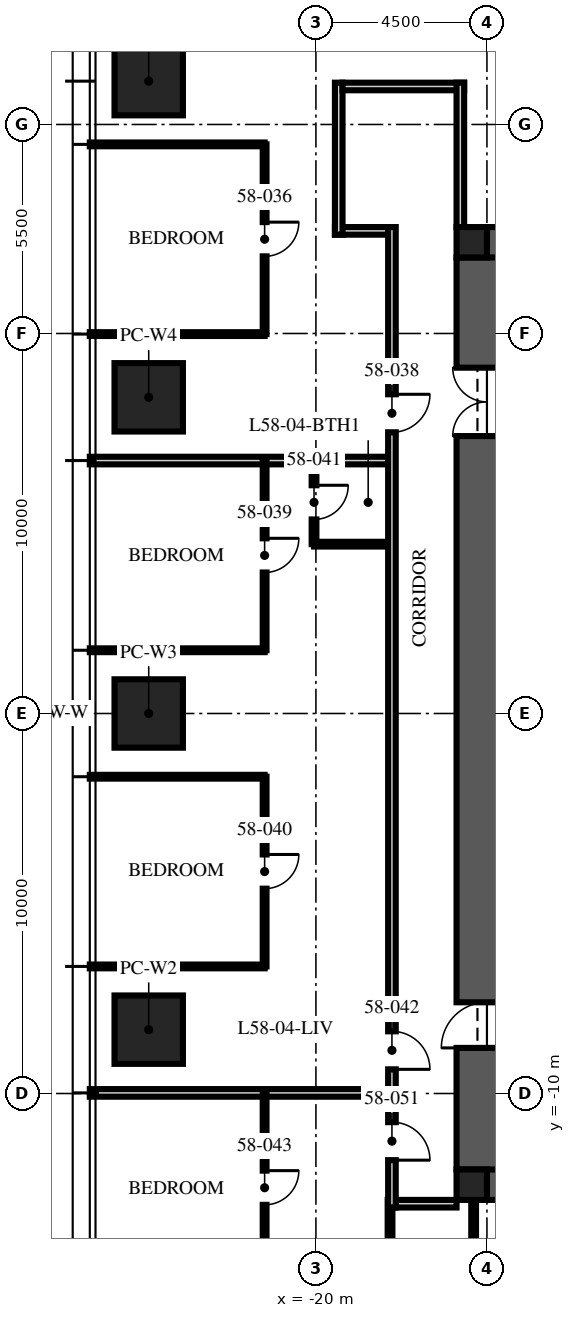
"""IFC4 building model, lengths in metres.
Left out: names, types, materials, properties, quantities, classifications, styles, units other than length and angle.
Written with IfcOpenShell. Run it as: python <this file> out.ifc"""

import sys

from ifc_helpers import new_model, si_unit, direction, frame, frame_2d, origin, origin_2d, place, context, subcontext, project, spatial, rectangle, extrude, element, fill, save


model = new_model("IFC4")
c1 = context("Model", 3, precision=1e-05, world=origin(), true_north=direction((0.0, 1.0)))
c2 = subcontext(c1, "Body", "Model", "MODEL_VIEW")
j1 = project(units=[si_unit("LENGTHUNIT", "METRE"), si_unit("PLANEANGLEUNIT", "RADIAN")], contexts=[c1])
p1 = place(None, origin())
s1 = spatial("IfcSite", under=j1, at=p1, CompositionType="ELEMENT")
p2 = place(p1, origin())
s2 = spatial("IfcBuilding", under=s1, at=p2, CompositionType="ELEMENT")
p3 = place(p2, frame((0.0, 0.0, 233.25)))
s3 = spatial("IfcBuildingStorey", under=s2, at=p3, CompositionType="ELEMENT", Elevation=233.25)
for number, where, z_axis, x_axis in (
    (1, (-15.5, 12.0, -0.25), (0.0, 0.0, 1.0), (1.0, 0.0, 0.0)),
    (2, (-15.5, -12.0, -0.25), (0.0, 0.0, 1.0), (1.0, 0.0, 0.0)),
):
    element("IfcWall", number, at=place(p3, frame(where, z_axis=z_axis, x_axis=x_axis)), inside=s3, PredefinedType="SHEAR", context=c2, shape_type="SweptSolid", body=[
        extrude(rectangle(XDim=31.0, YDim=1.6, at=frame_2d((15.5, 0.0))), origin(), (0.0, 0.0, 1.0), 3.75),
    ])
p4 = place(p3, frame((-15.5, -12.0, -0.25), z_axis=(0.0, 0.0, 1.0), x_axis=(0.0, 1.0, 0.0)))
e3 = element("IfcWall", 3, at=p4, inside=s3, PredefinedType="SHEAR", context=c2, shape_type="SweptSolid", body=[
    extrude(rectangle(XDim=24.0, YDim=1.6, at=frame_2d((12.0, 0.0))), origin(), (0.0, 0.0, 1.0), 3.75),
])
p5 = place(p4, frame((3.2, 0.0, 0.25)))
e4 = element("IfcOpeningElement", 4, at=p5, cuts=e3, PredefinedType="OPENING", context=c2, shape_type="SweptSolid", body=[
    extrude(rectangle(XDim=1.2, YDim=2.1, at=frame_2d((0.6, 1.05))), frame((0.0, 0.81, 0.0), z_axis=(0.0, -1.0, 0.0), x_axis=(1.0, 0.0, 0.0)), (0.0, 0.0, 1.0), 1.62),
])
p6 = place(p4, frame((19.3, 0.0, 0.25)))
e5 = element("IfcOpeningElement", 5, at=p6, cuts=e3, PredefinedType="OPENING", context=c2, shape_type="SweptSolid", body=[
    extrude(rectangle(XDim=1.8, YDim=2.1, at=frame_2d((0.9, 1.05))), frame((0.0, 0.81, 0.0), z_axis=(0.0, -1.0, 0.0), x_axis=(1.0, 0.0, 0.0)), (0.0, 0.0, 1.0), 1.62),
])
for number, where, z_axis, x_axis in (
    (6, (-15.9, 12.4, -0.25), (0.0, 0.0, 1.0), (1.0, 0.0, 0.0)),
    (7, (-15.9, -12.4, -0.25), (0.0, 0.0, 1.0), (1.0, 0.0, 0.0)),
):
    element("IfcColumn", number, at=place(p3, frame(where, z_axis=z_axis, x_axis=x_axis)), inside=s3, PredefinedType="COLUMN", context=c2, shape_type="SweptSolid", body=[
        extrude(rectangle(XDim=0.8, YDim=0.8, at=origin_2d()), origin(), (0.0, 0.0, 1.0), 3.75),
    ])
for number, where, z_axis, x_axis in (
    (8, (-24.4, -8.32, 0.0), (0.0, 0.0, 1.0), (0.0, 1.0, 0.0)),
    (9, (-24.4, 0.0, 0.0), (0.0, 0.0, 1.0), (0.0, 1.0, 0.0)),
    (10, (-24.4, 8.32, 0.0), (0.0, 0.0, 1.0), (0.0, 1.0, 0.0)),
    (11, (-24.4, 16.64, 0.0), (0.0, 0.0, 1.0), (0.0, 1.0, 0.0)),
):
    element("IfcColumn", number, at=place(p3, frame(where, z_axis=z_axis, x_axis=x_axis)), inside=s3, PredefinedType="COLUMN", context=c2, shape_type="SweptSolid", body=[
        extrude(rectangle(XDim=1.8, YDim=1.8, at=origin_2d()), origin(), (0.0, 0.0, 1.0), 3.75),
    ])
p7 = place(p3, frame((-18.1, 12.7, 0.0), z_axis=(0.0, 0.0, 1.0), x_axis=(-1.0, 0.0, 0.0)))
e12 = element("IfcWall", 12, at=p7, inside=s3, PredefinedType="PARTITIONING", context=c2, shape_type="SweptSolid", body=[
    extrude(rectangle(XDim=1.4, YDim=0.2, at=frame_2d((0.7, 0.0))), origin(), (0.0, 0.0, 1.0), 2.81),
])
p8 = place(p3, frame((-19.4, 12.6, 0.0), z_axis=(0.0, 0.0, 1.0), x_axis=(0.0, 1.0, 0.0)))
e13 = element("IfcWall", 13, at=p8, inside=s3, PredefinedType="PARTITIONING", context=c2, shape_type="SweptSolid", body=[
    extrude(rectangle(XDim=4.0, YDim=0.2, at=frame_2d((2.0, 0.0))), origin(), (0.0, 0.0, 1.0), 2.6),
])
p9 = place(p3, frame((-19.3, 16.5, 0.0), z_axis=(0.0, 0.0, 1.0), x_axis=(1.0, 0.0, 0.0)))
e14 = element("IfcWall", 14, at=p9, inside=s3, PredefinedType="PARTITIONING", context=c2, shape_type="SweptSolid", body=[
    extrude(rectangle(XDim=3.2, YDim=0.2, at=frame_2d((1.6, 0.0))), origin(), (0.0, 0.0, 1.0), 2.3),
])
p10 = place(p3, frame((-16.2, 16.6, 0.0), z_axis=(0.0, 0.0, 1.0), x_axis=(0.0, -1.0, 0.0)))
e15 = element("IfcWall", 15, at=p10, inside=s3, PredefinedType="PARTITIONING", context=c2, shape_type="SweptSolid", body=[
    extrude(rectangle(XDim=3.8, YDim=0.2, at=frame_2d((1.9, 0.0))), origin(), (0.0, 0.0, 1.0), 2.3),
])
p11 = place(p3, frame((-16.3, -12.9, 0.0), z_axis=(0.0, 0.0, 1.0), x_axis=(-1.0, 0.0, 0.0)))
e16 = element("IfcWall", 16, at=p11, inside=s3, PredefinedType="PARTITIONING", context=c2, shape_type="SweptSolid", body=[
    extrude(rectangle(XDim=1.6, YDim=0.2, at=frame_2d((0.8, 0.0))), origin(), (0.0, 0.0, 1.0), 2.3),
])
for number, where, z_axis, x_axis in (
    (17, (-21.35, 14.976, 0.0), (0.0, 0.0, 1.0), (-1.0, 0.0, 0.0)),
    (18, (-21.35, 9.984, 0.0), (0.0, 0.0, 1.0), (-1.0, 0.0, 0.0)),
):
    element("IfcWall", number, at=place(p3, frame(where, z_axis=z_axis, x_axis=x_axis)), inside=s3, PredefinedType="PARTITIONING", context=c2, shape_type="SweptSolid", body=[
        extrude(rectangle(XDim=4.6, YDim=0.1, at=frame_2d((2.3, 0.0))), origin(), (0.0, 0.0, 1.0), 2.91),
    ])
p12 = place(p3, frame((-18.1, 6.656, 0.0), z_axis=(0.0, 0.0, 1.0), x_axis=(-1.0, 0.0, 0.0)))
e19 = element("IfcWall", 19, at=p12, inside=s3, PredefinedType="PARTITIONING", context=c2, shape_type="SweptSolid", body=[
    extrude(rectangle(XDim=7.85, YDim=0.2, at=frame_2d((3.925, 0.0))), origin(), (0.0, 0.0, 1.0), 2.91),
])
for number, where, z_axis, x_axis in (
    (20, (-21.35, 1.664, 0.0), (0.0, 0.0, 1.0), (-1.0, 0.0, 0.0)),
    (21, (-21.35, -1.664, 0.0), (0.0, 0.0, 1.0), (-1.0, 0.0, 0.0)),
    (22, (-21.35, -6.656, 0.0), (0.0, 0.0, 1.0), (-1.0, 0.0, 0.0)),
):
    element("IfcWall", number, at=place(p3, frame(where, z_axis=z_axis, x_axis=x_axis)), inside=s3, PredefinedType="PARTITIONING", context=c2, shape_type="SweptSolid", body=[
        extrude(rectangle(XDim=4.6, YDim=0.1, at=frame_2d((2.3, 0.0))), origin(), (0.0, 0.0, 1.0), 2.91),
    ])
p13 = place(p3, frame((-18.1, -9.984, 0.0), z_axis=(0.0, 0.0, 1.0), x_axis=(-1.0, 0.0, 0.0)))
e23 = element("IfcWall", 23, at=p13, inside=s3, PredefinedType="PARTITIONING", context=c2, shape_type="SweptSolid", body=[
    extrude(rectangle(XDim=7.85, YDim=0.2, at=frame_2d((3.925, 0.0))), origin(), (0.0, 0.0, 1.0), 2.91),
])
p14 = place(p3, frame((-21.35, 14.976, 0.0), z_axis=(0.0, 0.0, 1.0), x_axis=(0.0, -1.0, 0.0)))
e24 = element("IfcWall", 24, at=p14, inside=s3, PredefinedType="PARTITIONING", context=c2, shape_type="SweptSolid", body=[
    extrude(rectangle(XDim=4.992, YDim=0.1, at=frame_2d((2.496, 0.0))), origin(), (0.0, 0.0, 1.0), 2.81),
])
p15 = place(p14, frame((2.046, 0.0, 0.0)))
e25 = element("IfcOpeningElement", 25, at=p15, cuts=e24, PredefinedType="OPENING", context=c2, shape_type="SweptSolid", body=[
    extrude(rectangle(XDim=0.9, YDim=2.1, at=frame_2d((0.45, 1.05))), frame((0.0, 0.06, 0.0), z_axis=(0.0, -1.0, 0.0), x_axis=(1.0, 0.0, 0.0)), (0.0, 0.0, 1.0), 0.12),
])
p16 = place(p3, frame((-21.35, 6.656, 0.0), z_axis=(0.0, 0.0, 1.0), x_axis=(0.0, -1.0, 0.0)))
e26 = element("IfcWall", 26, at=p16, inside=s3, PredefinedType="PARTITIONING", context=c2, shape_type="SweptSolid", body=[
    extrude(rectangle(XDim=4.992, YDim=0.1, at=frame_2d((2.496, 0.0))), origin(), (0.0, 0.0, 1.0), 2.81),
])
p17 = place(p16, frame((2.046, 0.0, 0.0)))
e27 = element("IfcOpeningElement", 27, at=p17, cuts=e26, PredefinedType="OPENING", context=c2, shape_type="SweptSolid", body=[
    extrude(rectangle(XDim=0.9, YDim=2.1, at=frame_2d((0.45, 1.05))), frame((0.0, 0.06, 0.0), z_axis=(0.0, -1.0, 0.0), x_axis=(1.0, 0.0, 0.0)), (0.0, 0.0, 1.0), 0.12),
])
p18 = place(p3, frame((-21.35, -1.664, 0.0), z_axis=(0.0, 0.0, 1.0), x_axis=(0.0, -1.0, 0.0)))
e28 = element("IfcWall", 28, at=p18, inside=s3, PredefinedType="PARTITIONING", context=c2, shape_type="SweptSolid", body=[
    extrude(rectangle(XDim=4.992, YDim=0.1, at=frame_2d((2.496, 0.0))), origin(), (0.0, 0.0, 1.0), 2.81),
])
p19 = place(p18, frame((2.046, 0.0, 0.0)))
e29 = element("IfcOpeningElement", 29, at=p19, cuts=e28, PredefinedType="OPENING", context=c2, shape_type="SweptSolid", body=[
    extrude(rectangle(XDim=0.9, YDim=2.1, at=frame_2d((0.45, 1.05))), frame((0.0, 0.06, 0.0), z_axis=(0.0, -1.0, 0.0), x_axis=(1.0, 0.0, 0.0)), (0.0, 0.0, 1.0), 0.12),
])
p20 = place(p3, frame((-20.05, 6.656, 0.0), z_axis=(0.0, 0.0, 1.0), x_axis=(0.0, -1.0, 0.0)))
e30 = element("IfcWall", 30, at=p20, inside=s3, PredefinedType="PARTITIONING", context=c2, shape_type="SweptSolid", body=[
    extrude(rectangle(XDim=2.2, YDim=0.125, at=frame_2d((1.1, 0.0))), origin(), (0.0, 0.0, 1.0), 3.5),
])
p21 = place(p20, frame((0.65, 0.0, 0.0)))
e31 = element("IfcOpeningElement", 31, at=p21, cuts=e30, PredefinedType="OPENING", context=c2, shape_type="SweptSolid", body=[
    extrude(rectangle(XDim=0.9, YDim=2.1, at=frame_2d((0.45, 1.05))), frame((0.0, 0.073, 0.0), z_axis=(0.0, -1.0, 0.0), x_axis=(1.0, 0.0, 0.0)), (0.0, 0.0, 1.0), 0.145),
])
p22 = place(p3, frame((-18.1, 4.456, 0.0), z_axis=(0.0, 0.0, 1.0), x_axis=(-1.0, 0.0, 0.0)))
e32 = element("IfcWall", 32, at=p22, inside=s3, PredefinedType="PARTITIONING", context=c2, shape_type="SweptSolid", body=[
    extrude(rectangle(XDim=1.95, YDim=0.125, at=frame_2d((0.975, 0.0))), origin(), (0.0, 0.0, 1.0), 3.5),
])
p23 = place(p3, frame((-21.35, -9.984, 0.0), z_axis=(0.0, 0.0, 1.0), x_axis=(0.0, -1.0, 0.0)))
e33 = element("IfcWall", 33, at=p23, inside=s3, PredefinedType="PARTITIONING", context=c2, shape_type="SweptSolid", body=[
    extrude(rectangle(XDim=4.992, YDim=0.1, at=frame_2d((2.496, 0.0))), origin(), (0.0, 0.0, 1.0), 2.81),
])
p24 = place(p23, frame((2.046, 0.0, 0.0)))
e34 = element("IfcOpeningElement", 34, at=p24, cuts=e33, PredefinedType="OPENING", context=c2, shape_type="SweptSolid", body=[
    extrude(rectangle(XDim=0.9, YDim=2.1, at=frame_2d((0.45, 1.05))), frame((0.0, 0.06, 0.0), z_axis=(0.0, -1.0, 0.0), x_axis=(1.0, 0.0, 0.0)), (0.0, 0.0, 1.0), 0.12),
])
for number, where, z_axis, x_axis in (
    (35, (-18.05, -12.8, 0.0), (0.0, 0.0, 1.0), (0.0, -1.0, 0.0)),
    (36, (-15.85, -12.8, 0.0), (0.0, 0.0, 1.0), (0.0, -1.0, 0.0)),
):
    element("IfcWall", number, at=place(p3, frame(where, z_axis=z_axis, x_axis=x_axis)), inside=s3, PredefinedType="PARTITIONING", context=c2, shape_type="SweptSolid", body=[
        extrude(rectangle(XDim=2.8, YDim=0.125, at=frame_2d((1.4, 0.0))), origin(), (0.0, 0.0, 1.0), 2.3),
    ])
p25 = place(p3, frame((-18.0, 12.8, 0.0), z_axis=(0.0, 0.0, 1.0), x_axis=(0.0, -1.0, 0.0)))
e37 = element("IfcWall", 37, at=p25, inside=s3, PredefinedType="PARTITIONING", context=c2, shape_type="SweptSolid", body=[
    extrude(rectangle(XDim=25.8, YDim=0.2, at=frame_2d((12.9, 0.0))), origin(), (0.0, 0.0, 1.0), 2.6),
])
p26 = place(p25, frame((4.4, 0.0, 0.0)))
e38 = element("IfcOpeningElement", 38, at=p26, cuts=e37, PredefinedType="OPENING", context=c2, shape_type="SweptSolid", body=[
    extrude(rectangle(XDim=1.0, YDim=2.2, at=frame_2d((0.5, 1.1))), frame((0.0, 0.11, 0.0), z_axis=(0.0, -1.0, 0.0), x_axis=(1.0, 0.0, 0.0)), (0.0, 0.0, 1.0), 0.22),
])
p27 = place(p25, frame((21.164, 0.0, 0.0)))
e39 = element("IfcOpeningElement", 39, at=p27, cuts=e37, PredefinedType="OPENING", context=c2, shape_type="SweptSolid", body=[
    extrude(rectangle(XDim=1.0, YDim=2.2, at=frame_2d((0.5, 1.1))), frame((0.0, 0.11, 0.0), z_axis=(0.0, -1.0, 0.0), x_axis=(1.0, 0.0, 0.0)), (0.0, 0.0, 1.0), 0.22),
])
p28 = place(p25, frame((23.554, 0.0, 0.0)))
e40 = element("IfcOpeningElement", 40, at=p28, cuts=e37, PredefinedType="OPENING", context=c2, shape_type="SweptSolid", body=[
    extrude(rectangle(XDim=1.0, YDim=2.2, at=frame_2d((0.5, 1.1))), frame((0.0, 0.11, 0.0), z_axis=(0.0, -1.0, 0.0), x_axis=(1.0, 0.0, 0.0)), (0.0, 0.0, 1.0), 0.22),
])
p29 = place(p5, origin())
e41 = element("IfcDoor", 41, at=p29, inside=s3, OperationType="SINGLE_SWING_LEFT", PredefinedType="DOOR", context=c2, shape_type="SweptSolid", body=[
    extrude(rectangle(XDim=1.2, YDim=2.1, at=frame_2d((0.6, 1.05))), frame((0.0, 0.025, 0.0), z_axis=(0.0, -1.0, 0.0), x_axis=(1.0, 0.0, 0.0)), (0.0, 0.0, 1.0), 0.05),
])
fill(e4, e41)
p30 = place(p6, origin())
e42 = element("IfcDoor", 42, at=p30, inside=s3, OperationType="DOUBLE_DOOR_SINGLE_SWING", PredefinedType="DOOR", context=c2, shape_type="SweptSolid", body=[
    extrude(rectangle(XDim=1.8, YDim=2.1, at=frame_2d((0.9, 1.05))), frame((0.0, 0.025, 0.0), z_axis=(0.0, -1.0, 0.0), x_axis=(1.0, 0.0, 0.0)), (0.0, 0.0, 1.0), 0.05),
])
fill(e5, e42)
p31 = place(p15, origin())
e43 = element("IfcDoor", 43, at=p31, inside=s3, OperationType="SINGLE_SWING_LEFT", PredefinedType="DOOR", context=c2, shape_type="SweptSolid", body=[
    extrude(rectangle(XDim=0.9, YDim=2.1, at=frame_2d((0.45, 1.05))), frame((0.0, 0.025, 0.0), z_axis=(0.0, -1.0, 0.0), x_axis=(1.0, 0.0, 0.0)), (0.0, 0.0, 1.0), 0.05),
])
fill(e25, e43)
p32 = place(p26, origin())
e44 = element("IfcDoor", 44, at=p32, inside=s3, OperationType="SINGLE_SWING_LEFT", PredefinedType="DOOR", context=c2, shape_type="SweptSolid", body=[
    extrude(rectangle(XDim=1.0, YDim=2.2, at=frame_2d((0.5, 1.1))), frame((0.0, 0.025, 0.0), z_axis=(0.0, -1.0, 0.0), x_axis=(1.0, 0.0, 0.0)), (0.0, 0.0, 1.0), 0.05),
])
fill(e38, e44)
p33 = place(p17, origin())
e45 = element("IfcDoor", 45, at=p33, inside=s3, OperationType="SINGLE_SWING_LEFT", PredefinedType="DOOR", context=c2, shape_type="SweptSolid", body=[
    extrude(rectangle(XDim=0.9, YDim=2.1, at=frame_2d((0.45, 1.05))), frame((0.0, 0.025, 0.0), z_axis=(0.0, -1.0, 0.0), x_axis=(1.0, 0.0, 0.0)), (0.0, 0.0, 1.0), 0.05),
])
fill(e27, e45)
p34 = place(p19, origin())
e46 = element("IfcDoor", 46, at=p34, inside=s3, OperationType="SINGLE_SWING_LEFT", PredefinedType="DOOR", context=c2, shape_type="SweptSolid", body=[
    extrude(rectangle(XDim=0.9, YDim=2.1, at=frame_2d((0.45, 1.05))), frame((0.0, 0.025, 0.0), z_axis=(0.0, -1.0, 0.0), x_axis=(1.0, 0.0, 0.0)), (0.0, 0.0, 1.0), 0.05),
])
fill(e29, e46)
p35 = place(p21, origin())
e47 = element("IfcDoor", 47, at=p35, inside=s3, OperationType="SINGLE_SWING_LEFT", PredefinedType="DOOR", context=c2, shape_type="SweptSolid", body=[
    extrude(rectangle(XDim=0.9, YDim=2.1, at=frame_2d((0.45, 1.05))), frame((0.0, 0.025, 0.0), z_axis=(0.0, -1.0, 0.0), x_axis=(1.0, 0.0, 0.0)), (0.0, 0.0, 1.0), 0.05),
])
fill(e31, e47)
p36 = place(p27, origin())
e48 = element("IfcDoor", 48, at=p36, inside=s3, OperationType="SINGLE_SWING_RIGHT", PredefinedType="DOOR", context=c2, shape_type="SweptSolid", body=[
    extrude(rectangle(XDim=1.0, YDim=2.2, at=frame_2d((0.5, 1.1))), frame((0.0, 0.025, 0.0), z_axis=(0.0, -1.0, 0.0), x_axis=(1.0, 0.0, 0.0)), (0.0, 0.0, 1.0), 0.05),
])
fill(e39, e48)
p37 = place(p24, origin())
e49 = element("IfcDoor", 49, at=p37, inside=s3, OperationType="SINGLE_SWING_LEFT", PredefinedType="DOOR", context=c2, shape_type="SweptSolid", body=[
    extrude(rectangle(XDim=0.9, YDim=2.1, at=frame_2d((0.45, 1.05))), frame((0.0, 0.025, 0.0), z_axis=(0.0, -1.0, 0.0), x_axis=(1.0, 0.0, 0.0)), (0.0, 0.0, 1.0), 0.05),
])
fill(e34, e49)
p38 = place(p28, origin())
e50 = element("IfcDoor", 50, at=p38, inside=s3, OperationType="SINGLE_SWING_RIGHT", PredefinedType="DOOR", context=c2, shape_type="SweptSolid", body=[
    extrude(rectangle(XDim=1.0, YDim=2.2, at=frame_2d((0.5, 1.1))), frame((0.0, 0.025, 0.0), z_axis=(0.0, -1.0, 0.0), x_axis=(1.0, 0.0, 0.0)), (0.0, 0.0, 1.0), 0.05),
])
fill(e40, e50)
save(model, sys.argv[1])
